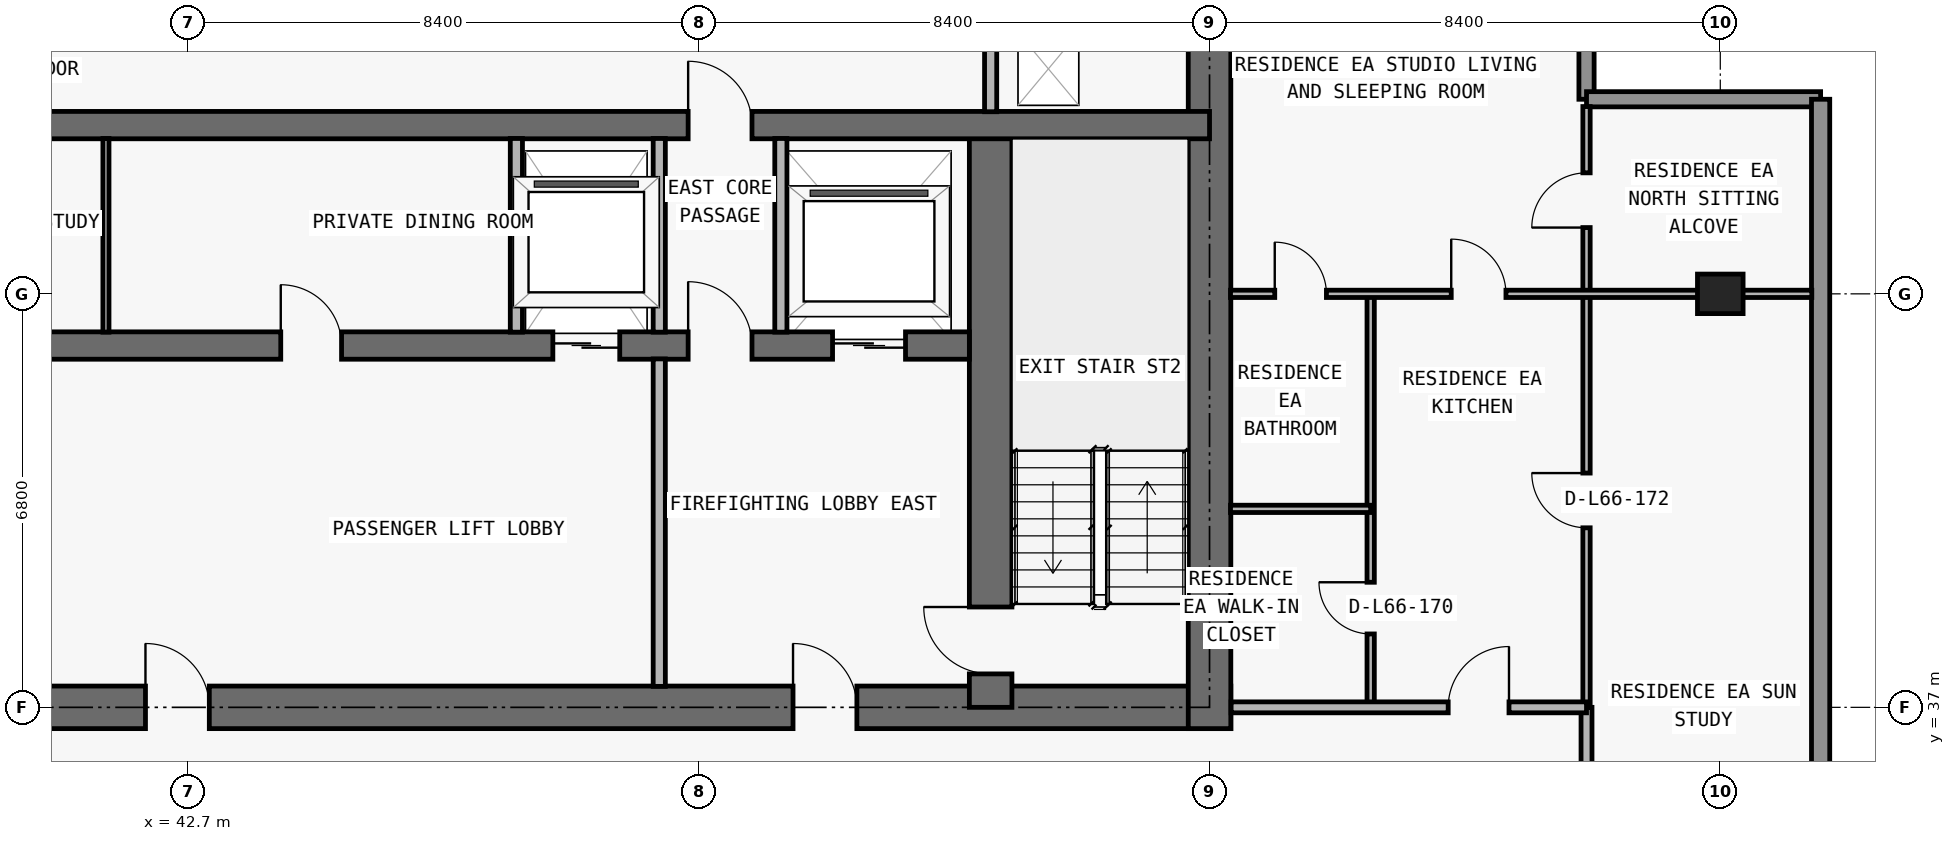
"""IFC4 building model, lengths in metres.
Left out: names, types, materials, properties, quantities, classifications, styles, units other than length and angle.
Written with IfcOpenShell. Run it as: python <this file> out.ifc"""

import sys

from ifc_helpers import new_model, si_unit, direction, frame, frame_2d, origin, origin_2d, place, context, subcontext, project, spatial, rectangle, extrude, element, fill, save


model = new_model("IFC4")
c1 = context("Model", 3, precision=1e-05, world=origin(), true_north=direction((0.0, 1.0)))
c2 = subcontext(c1, "Body", "Model", "MODEL_VIEW")
j1 = project(units=[si_unit("LENGTHUNIT", "METRE"), si_unit("PLANEANGLEUNIT", "RADIAN")], contexts=[c1])
p1 = place(None, origin())
s1 = spatial("IfcSite", under=j1, at=p1, CompositionType="ELEMENT")
p2 = place(p1, origin())
s2 = spatial("IfcBuilding", under=s1, at=p2, CompositionType="ELEMENT")
p3 = place(p2, frame((0.0, 0.0, 236.4)))
s3 = spatial("IfcBuildingStorey", under=s2, at=p3, CompositionType="ELEMENT", Elevation=236.4)
p4 = place(p3, frame((67.9, 43.8, 0.0), z_axis=(0.0, 0.0, 1.0), x_axis=(1.0, 0.0, 0.0)))
e1 = element("IfcColumn", 1, at=p4, inside=s3, PredefinedType="COLUMN", context=c2, shape_type="SweptSolid", body=[
    extrude(rectangle(XDim=0.75, YDim=0.65, at=origin_2d()), origin(), (0.0, 0.0, 1.0), 3.05),
])
p5 = place(p3, frame((17.95, 37.0, 0.0), z_axis=(0.0, 0.0, 1.0), x_axis=(1.0, 0.0, 0.0)))
e2 = element("IfcWall", 2, at=p5, inside=s3, PredefinedType="SHEAR", context=c2, shape_type="SweptSolid", body=[
    extrude(rectangle(XDim=41.9, YDim=0.7, at=frame_2d((20.95, 0.0))), origin(), (0.0, 0.0, 1.0), 3.05),
])
p6 = place(p5, frame((14.35, 0.0, 0.0)))
e3 = element("IfcOpeningElement", 3, at=p6, cuts=e2, PredefinedType="OPENING", context=c2, shape_type="SweptSolid", body=[
    extrude(rectangle(XDim=1.1, YDim=2.15, at=frame_2d((0.55, 1.075))), frame((0.0, 0.36, 0.0), z_axis=(0.0, -1.0, 0.0), x_axis=(1.0, 0.0, 0.0)), (0.0, 0.0, 1.0), 0.72),
])
p7 = place(p5, frame((6.2, 0.0, 0.0)))
e4 = element("IfcOpeningElement", 4, at=p7, cuts=e2, PredefinedType="OPENING", context=c2, shape_type="SweptSolid", body=[
    extrude(rectangle(XDim=1.05, YDim=2.15, at=frame_2d((0.525, 1.075))), frame((0.0, 0.36, 0.0), z_axis=(0.0, -1.0, 0.0), x_axis=(1.0, 0.0, 0.0)), (0.0, 0.0, 1.0), 0.72),
])
p8 = place(p5, frame((34.7, 0.0, 0.0)))
e5 = element("IfcOpeningElement", 5, at=p8, cuts=e2, PredefinedType="OPENING", context=c2, shape_type="SweptSolid", body=[
    extrude(rectangle(XDim=1.05, YDim=2.15, at=frame_2d((0.525, 1.075))), frame((0.0, 0.36, 0.0), z_axis=(0.0, -1.0, 0.0), x_axis=(1.0, 0.0, 0.0)), (0.0, 0.0, 1.0), 0.72),
])
p9 = place(p5, frame((10.812, 0.0, 0.0)))
e6 = element("IfcOpeningElement", 6, at=p9, cuts=e2, PredefinedType="OPENING", context=c2, shape_type="SweptSolid", body=[
    extrude(rectangle(XDim=1.05, YDim=2.15, at=frame_2d((0.525, 1.075))), frame((0.0, 0.36, 0.0), z_axis=(0.0, -1.0, 0.0), x_axis=(1.0, 0.0, 0.0)), (0.0, 0.0, 1.0), 0.72),
])
p10 = place(p5, frame((24.05, 0.0, 0.0)))
e7 = element("IfcOpeningElement", 7, at=p10, cuts=e2, PredefinedType="OPENING", context=c2, shape_type="SweptSolid", body=[
    extrude(rectangle(XDim=1.05, YDim=2.15, at=frame_2d((0.525, 1.075))), frame((0.0, 0.36, 0.0), z_axis=(0.0, -1.0, 0.0), x_axis=(1.0, 0.0, 0.0)), (0.0, 0.0, 1.0), 0.72),
])
p11 = place(p3, frame((59.5, 36.65, 0.0), z_axis=(0.0, 0.0, 1.0), x_axis=(0.0, 1.0, 0.0)))
e8 = element("IfcWall", 8, at=p11, inside=s3, PredefinedType="SHEAR", context=c2, shape_type="SweptSolid", body=[
    extrude(rectangle(XDim=13.95, YDim=0.7, at=frame_2d((6.975, 0.0))), origin(), (0.0, 0.0, 1.0), 3.05),
])
p12 = place(p3, frame((55.9, 37.0, 0.0), z_axis=(0.0, 0.0, 1.0), x_axis=(0.0, 1.0, 0.0)))
e9 = element("IfcWall", 9, at=p12, inside=s3, PredefinedType="SHEAR", context=c2, shape_type="SweptSolid", body=[
    extrude(rectangle(XDim=9.575, YDim=0.7, at=frame_2d((4.788, 0.0))), origin(), (0.0, 0.0, 1.0), 3.05),
])
p13 = place(p12, frame((0.55, 0.0, 0.0)))
e10 = element("IfcOpeningElement", 10, at=p13, cuts=e9, PredefinedType="OPENING", context=c2, shape_type="SweptSolid", body=[
    extrude(rectangle(XDim=1.1, YDim=2.15, at=frame_2d((0.55, 1.075))), frame((0.0, 0.36, 0.0), z_axis=(0.0, -1.0, 0.0), x_axis=(1.0, 0.0, 0.0)), (0.0, 0.0, 1.0), 0.72),
])
p14 = place(p3, frame((22.25, 42.95, 0.0), z_axis=(0.0, 0.0, 1.0), x_axis=(1.0, 0.0, 0.0)))
e11 = element("IfcWall", 11, at=p14, inside=s3, PredefinedType="SHEAR", context=c2, shape_type="SweptSolid", body=[
    extrude(rectangle(XDim=33.3, YDim=0.45, at=frame_2d((16.65, 0.0))), origin(), (0.0, 0.0, 1.0), 3.05),
])
p15 = place(p14, frame((1.05, 0.0, 0.0)))
e12 = element("IfcOpeningElement", 12, at=p15, cuts=e11, PredefinedType="OPENING", context=c2, shape_type="SweptSolid", body=[
    extrude(rectangle(XDim=1.2, YDim=2.2, at=frame_2d((0.6, 1.1))), frame((0.0, 0.235, 0.0), z_axis=(0.0, -1.0, 0.0), x_axis=(1.0, 0.0, 0.0)), (0.0, 0.0, 1.0), 0.47),
])
p16 = place(p14, frame((31.05, 0.0, 0.0)))
e13 = element("IfcOpeningElement", 13, at=p16, cuts=e11, PredefinedType="OPENING", context=c2, shape_type="SweptSolid", body=[
    extrude(rectangle(XDim=1.2, YDim=2.2, at=frame_2d((0.6, 1.1))), frame((0.0, 0.235, 0.0), z_axis=(0.0, -1.0, 0.0), x_axis=(1.0, 0.0, 0.0)), (0.0, 0.0, 1.0), 0.47),
])
p17 = place(p14, frame((26.45, 0.0, 0.0)))
e14 = element("IfcOpeningElement", 14, at=p17, cuts=e11, PredefinedType="OPENING", context=c2, shape_type="SweptSolid", body=[
    extrude(rectangle(XDim=1.1, YDim=2.2, at=frame_2d((0.55, 1.1))), frame((0.0, 0.235, 0.0), z_axis=(0.0, -1.0, 0.0), x_axis=(1.0, 0.0, 0.0)), (0.0, 0.0, 1.0), 0.47),
])
p18 = place(p14, frame((5.95, 0.0, 0.0)))
e15 = element("IfcOpeningElement", 15, at=p18, cuts=e11, PredefinedType="OPENING", context=c2, shape_type="SweptSolid", body=[
    extrude(rectangle(XDim=1.1, YDim=2.2, at=frame_2d((0.55, 1.1))), frame((0.0, 0.235, 0.0), z_axis=(0.0, -1.0, 0.0), x_axis=(1.0, 0.0, 0.0)), (0.0, 0.0, 1.0), 0.47),
])
p19 = place(p14, frame((3.625, 0.0, 0.0)))
e16 = element("IfcOpeningElement", 16, at=p19, cuts=e11, PredefinedType="OPENING", context=c2, shape_type="SweptSolid", body=[
    extrude(rectangle(XDim=1.05, YDim=2.15, at=frame_2d((0.525, 1.075))), frame((0.0, 0.235, 0.0), z_axis=(0.0, -1.0, 0.0), x_axis=(1.0, 0.0, 0.0)), (0.0, 0.0, 1.0), 0.47),
])
p20 = place(p14, frame((28.675, 0.0, 0.0)))
e17 = element("IfcOpeningElement", 17, at=p20, cuts=e11, PredefinedType="OPENING", context=c2, shape_type="SweptSolid", body=[
    extrude(rectangle(XDim=1.05, YDim=2.15, at=frame_2d((0.525, 1.075))), frame((0.0, 0.235, 0.0), z_axis=(0.0, -1.0, 0.0), x_axis=(1.0, 0.0, 0.0)), (0.0, 0.0, 1.0), 0.47),
])
p21 = place(p14, frame((15.225, 0.0, 0.0)))
e18 = element("IfcOpeningElement", 18, at=p21, cuts=e11, PredefinedType="OPENING", context=c2, shape_type="SweptSolid", body=[
    extrude(rectangle(XDim=1.0, YDim=2.2, at=frame_2d((0.5, 1.1))), frame((0.0, 0.235, 0.0), z_axis=(0.0, -1.0, 0.0), x_axis=(1.0, 0.0, 0.0)), (0.0, 0.0, 1.0), 0.47),
])
p22 = place(p14, frame((21.975, 0.0, 0.0)))
e19 = element("IfcOpeningElement", 19, at=p22, cuts=e11, PredefinedType="OPENING", context=c2, shape_type="SweptSolid", body=[
    extrude(rectangle(XDim=1.0, YDim=2.2, at=frame_2d((0.5, 1.1))), frame((0.0, 0.235, 0.0), z_axis=(0.0, -1.0, 0.0), x_axis=(1.0, 0.0, 0.0)), (0.0, 0.0, 1.0), 0.47),
])
p23 = place(p3, frame((18.3, 46.575, 0.0), z_axis=(0.0, 0.0, 1.0), x_axis=(1.0, 0.0, 0.0)))
e20 = element("IfcWall", 20, at=p23, inside=s3, PredefinedType="SHEAR", context=c2, shape_type="SweptSolid", body=[
    extrude(rectangle(XDim=41.2, YDim=0.45, at=frame_2d((20.6, 0.0))), origin(), (0.0, 0.0, 1.0), 3.05),
])
p24 = place(p23, frame((7.575, 0.0, 0.0)))
e21 = element("IfcOpeningElement", 21, at=p24, cuts=e20, PredefinedType="OPENING", context=c2, shape_type="SweptSolid", body=[
    extrude(rectangle(XDim=1.05, YDim=2.15, at=frame_2d((0.525, 1.075))), frame((0.0, 0.235, 0.0), z_axis=(0.0, -1.0, 0.0), x_axis=(1.0, 0.0, 0.0)), (0.0, 0.0, 1.0), 0.47),
])
p25 = place(p23, frame((32.625, 0.0, 0.0)))
e22 = element("IfcOpeningElement", 22, at=p25, cuts=e20, PredefinedType="OPENING", context=c2, shape_type="SweptSolid", body=[
    extrude(rectangle(XDim=1.05, YDim=2.15, at=frame_2d((0.525, 1.075))), frame((0.0, 0.235, 0.0), z_axis=(0.0, -1.0, 0.0), x_axis=(1.0, 0.0, 0.0)), (0.0, 0.0, 1.0), 0.47),
])
p26 = place(p3, frame((65.7, 50.45, 0.0), z_axis=(0.0, 0.0, 1.0), x_axis=(0.0, -1.0, 0.0)))
e23 = element("IfcWall", 23, at=p26, inside=s3, PredefinedType="ELEMENTEDWALL", context=c2, shape_type="SweptSolid", body=[
    extrude(rectangle(XDim=3.45, YDim=0.25, at=frame_2d((1.725, 0.0))), origin(), (0.0, 0.0, 1.0), 3.05),
])
p27 = place(p3, frame((65.7, 47.0, 0.0), z_axis=(0.0, 0.0, 1.0), x_axis=(1.0, 0.0, 0.0)))
e24 = element("IfcWall", 24, at=p27, inside=s3, PredefinedType="ELEMENTEDWALL", context=c2, shape_type="SweptSolid", body=[
    extrude(rectangle(XDim=3.85, YDim=0.25, at=frame_2d((1.925, 0.0))), origin(), (0.0, 0.0, 1.0), 3.05),
])
p28 = place(p3, frame((69.55, 47.0, 0.0), z_axis=(0.0, 0.0, 1.0), x_axis=(0.0, -1.0, 0.0)))
e25 = element("IfcWall", 25, at=p28, inside=s3, PredefinedType="STANDARD", context=c2, shape_type="SweptSolid", body=[
    extrude(rectangle(XDim=16.85, YDim=0.3, at=frame_2d((8.425, 0.0))), origin(), (0.0, 0.0, 1.0), 3.05),
])
p29 = place(p3, frame((41.35, 43.17, 0.0), z_axis=(0.0, 0.0, 1.0), x_axis=(0.0, 1.0, 0.0)))
e26 = element("IfcWall", 26, at=p29, inside=s3, PredefinedType="MOVABLE", context=c2, shape_type="SweptSolid", body=[
    extrude(rectangle(XDim=3.185, YDim=0.1, at=frame_2d((1.593, 0.0))), origin(), (0.0, 0.0, 1.0), 3.05),
])
p30 = place(p3, frame((48.1, 43.17, 0.0), z_axis=(0.0, 0.0, 1.0), x_axis=(0.0, 1.0, 0.0)))
e27 = element("IfcWall", 27, at=p30, inside=s3, PredefinedType="PARTITIONING", context=c2, shape_type="SweptSolid", body=[
    extrude(rectangle(XDim=3.185, YDim=0.2, at=frame_2d((1.593, 0.0))), origin(), (0.0, 0.0, 1.0), 3.05),
])
p31 = place(p3, frame((50.45, 37.345, 0.0), z_axis=(0.0, 0.0, 1.0), x_axis=(0.0, 1.0, 0.0)))
e28 = element("IfcWall", 28, at=p31, inside=s3, PredefinedType="PARTITIONING", context=c2, shape_type="SweptSolid", body=[
    extrude(rectangle(XDim=5.385, YDim=0.2, at=frame_2d((2.692, 0.0))), origin(), (0.0, 0.0, 1.0), 3.05),
])
for number, where, z_axis, x_axis in (
    (29, (50.45, 43.17, 0.0), (0.0, 0.0, 1.0), (0.0, 1.0, 0.0)),
    (30, (52.45, 43.17, 0.0), (0.0, 0.0, 1.0), (0.0, 1.0, 0.0)),
):
    element("IfcWall", number, at=place(p3, frame(where, z_axis=z_axis, x_axis=x_axis)), inside=s3, PredefinedType="PARTITIONING", context=c2, shape_type="SweptSolid", body=[
        extrude(rectangle(XDim=3.185, YDim=0.2, at=frame_2d((1.593, 0.0))), origin(), (0.0, 0.0, 1.0), 3.05),
    ])
p32 = place(p3, frame((55.9, 46.795, 0.0), z_axis=(0.0, 0.0, 1.0), x_axis=(0.0, 1.0, 0.0)))
e31 = element("IfcWall", 31, at=p32, inside=s3, PredefinedType="PARTITIONING", context=c2, shape_type="SweptSolid", body=[
    extrude(rectangle(XDim=3.16, YDim=0.2, at=frame_2d((1.58, 0.0))), origin(), (0.0, 0.0, 1.0), 3.05),
])
p33 = place(p3, frame((62.15, 37.0, 0.0), z_axis=(0.0, 0.0, 1.0), x_axis=(0.0, 1.0, 0.0)))
e32 = element("IfcWall", 32, at=p33, inside=s3, PredefinedType="PARTITIONING", context=c2, shape_type="SweptSolid", body=[
    extrude(rectangle(XDim=6.8, YDim=0.12, at=frame_2d((3.4, 0.0))), origin(), (0.0, 0.0, 1.0), 3.05),
])
p34 = place(p33, frame((1.207, 0.0, 0.0)))
e33 = element("IfcOpeningElement", 33, at=p34, cuts=e32, PredefinedType="OPENING", context=c2, shape_type="SweptSolid", body=[
    extrude(rectangle(XDim=0.85, YDim=2.1, at=frame_2d((0.425, 1.05))), frame((0.0, 0.07, 0.0), z_axis=(0.0, -1.0, 0.0), x_axis=(1.0, 0.0, 0.0)), (0.0, 0.0, 1.0), 0.14),
])
p35 = place(p3, frame((65.7, 34.005, 0.0), z_axis=(0.0, 0.0, 1.0), x_axis=(0.0, 1.0, 0.0)))
e34 = element("IfcWall", 34, at=p35, inside=s3, PredefinedType="PARTITIONING", context=c2, shape_type="SweptSolid", body=[
    extrude(rectangle(XDim=2.995, YDim=0.18, at=frame_2d((1.498, 0.0))), origin(), (0.0, 0.0, 1.0), 2.629),
])
p36 = place(p3, frame((65.7, 37.005, 0.0), z_axis=(0.0, 0.0, 1.0), x_axis=(0.0, 1.0, 0.0)))
e35 = element("IfcWall", 35, at=p36, inside=s3, PredefinedType="PARTITIONING", context=c2, shape_type="SweptSolid", body=[
    extrude(rectangle(XDim=9.875, YDim=0.12, at=frame_2d((4.938, 0.0))), origin(), (0.0, 0.0, 1.0), 2.629),
])
p37 = place(p36, frame((2.948, 0.0, 0.0)))
e36 = element("IfcOpeningElement", 36, at=p37, cuts=e35, PredefinedType="OPENING", context=c2, shape_type="SweptSolid", body=[
    extrude(rectangle(XDim=0.9, YDim=2.15, at=frame_2d((0.45, 1.075))), frame((0.0, 0.07, 0.0), z_axis=(0.0, -1.0, 0.0), x_axis=(1.0, 0.0, 0.0)), (0.0, 0.0, 1.0), 0.14),
])
p38 = place(p36, frame((7.885, 0.0, 0.0)))
e37 = element("IfcOpeningElement", 37, at=p38, cuts=e35, PredefinedType="OPENING", context=c2, shape_type="SweptSolid", body=[
    extrude(rectangle(XDim=0.9, YDim=2.15, at=frame_2d((0.45, 1.075))), frame((0.0, 0.07, 0.0), z_axis=(0.0, -1.0, 0.0), x_axis=(1.0, 0.0, 0.0)), (0.0, 0.0, 1.0), 0.14),
])
p39 = place(p3, frame((59.855, 37.0, 0.0), z_axis=(0.0, 0.0, 1.0), x_axis=(1.0, 0.0, 0.0)))
e38 = element("IfcWall", 38, at=p39, inside=s3, PredefinedType="PARTITIONING", context=c2, shape_type="SweptSolid", body=[
    extrude(rectangle(XDim=5.845, YDim=0.18, at=frame_2d((2.922, 0.0))), origin(), (0.0, 0.0, 1.0), 3.05),
])
p40 = place(p39, frame((3.57, 0.0, 0.0)))
e39 = element("IfcOpeningElement", 39, at=p40, cuts=e38, PredefinedType="OPENING", context=c2, shape_type="SweptSolid", body=[
    extrude(rectangle(XDim=1.0, YDim=2.2, at=frame_2d((0.5, 1.1))), frame((0.0, 0.1, 0.0), z_axis=(0.0, -1.0, 0.0), x_axis=(1.0, 0.0, 0.0)), (0.0, 0.0, 1.0), 0.2),
])
p41 = place(p3, frame((59.845, 40.264, 0.0), z_axis=(0.0, 0.0, 1.0), x_axis=(1.0, 0.0, 0.0)))
e40 = element("IfcWall", 40, at=p41, inside=s3, PredefinedType="PARTITIONING", context=c2, shape_type="SweptSolid", body=[
    extrude(rectangle(XDim=2.305, YDim=0.12, at=frame_2d((1.152, 0.0))), origin(), (0.0, 0.0, 1.0), 3.05),
])
p42 = place(p3, frame((59.845, 43.8, 0.0), z_axis=(0.0, 0.0, 1.0), x_axis=(1.0, 0.0, 0.0)))
e41 = element("IfcWall", 41, at=p42, inside=s3, PredefinedType="PARTITIONING", context=c2, shape_type="SweptSolid", body=[
    extrude(rectangle(XDim=9.56, YDim=0.12, at=frame_2d((4.78, 0.0))), origin(), (0.0, 0.0, 1.0), 2.418),
])
p43 = place(p42, frame((3.63, 0.0, 0.0)))
e42 = element("IfcOpeningElement", 42, at=p43, cuts=e41, PredefinedType="OPENING", context=c2, shape_type="SweptSolid", body=[
    extrude(rectangle(XDim=0.9, YDim=2.15, at=frame_2d((0.45, 1.075))), frame((0.0, 0.07, 0.0), z_axis=(0.0, -1.0, 0.0), x_axis=(1.0, 0.0, 0.0)), (0.0, 0.0, 1.0), 0.14),
])
p44 = place(p42, frame((0.728, 0.0, 0.0)))
e43 = element("IfcOpeningElement", 43, at=p44, cuts=e41, PredefinedType="OPENING", context=c2, shape_type="SweptSolid", body=[
    extrude(rectangle(XDim=0.85, YDim=2.1, at=frame_2d((0.425, 1.05))), frame((0.0, 0.07, 0.0), z_axis=(0.0, -1.0, 0.0), x_axis=(1.0, 0.0, 0.0)), (0.0, 0.0, 1.0), 0.14),
])
p45 = place(p16, origin())
e44 = element("IfcDoor", 44, at=p45, inside=s3, OperationType="DOUBLE_DOOR_SLIDING", PredefinedType="DOOR", context=c2, shape_type="SweptSolid", body=[
    extrude(rectangle(XDim=1.2, YDim=2.2, at=frame_2d((0.6, 1.1))), frame((0.0, 0.025, 0.0), z_axis=(0.0, -1.0, 0.0), x_axis=(1.0, 0.0, 0.0)), (0.0, 0.0, 1.0), 0.05),
])
fill(e13, e44)
p46 = place(p17, origin())
e45 = element("IfcDoor", 45, at=p46, inside=s3, OperationType="DOUBLE_DOOR_SLIDING", PredefinedType="DOOR", context=c2, shape_type="SweptSolid", body=[
    extrude(rectangle(XDim=1.1, YDim=2.2, at=frame_2d((0.55, 1.1))), frame((0.0, 0.025, 0.0), z_axis=(0.0, -1.0, 0.0), x_axis=(1.0, 0.0, 0.0)), (0.0, 0.0, 1.0), 0.05),
])
fill(e14, e45)
p47 = place(p8, origin())
e46 = element("IfcDoor", 46, at=p47, inside=s3, OperationType="SINGLE_SWING_LEFT", PredefinedType="DOOR", context=c2, shape_type="SweptSolid", body=[
    extrude(rectangle(XDim=1.05, YDim=2.15, at=frame_2d((0.525, 1.075))), frame((0.0, 0.025, 0.0), z_axis=(0.0, -1.0, 0.0), x_axis=(1.0, 0.0, 0.0)), (0.0, 0.0, 1.0), 0.05),
])
fill(e5, e46)
p48 = place(p13, origin())
e47 = element("IfcDoor", 47, at=p48, inside=s3, OperationType="SINGLE_SWING_RIGHT", PredefinedType="DOOR", context=c2, shape_type="SweptSolid", body=[
    extrude(rectangle(XDim=1.1, YDim=2.15, at=frame_2d((0.55, 1.075))), frame((0.0, 0.025, 0.0), z_axis=(0.0, -1.0, 0.0), x_axis=(1.0, 0.0, 0.0)), (0.0, 0.0, 1.0), 0.05),
])
fill(e10, e47)
p49 = place(p20, origin())
e48 = element("IfcDoor", 48, at=p49, inside=s3, OperationType="SINGLE_SWING_LEFT", PredefinedType="DOOR", context=c2, shape_type="SweptSolid", body=[
    extrude(rectangle(XDim=1.05, YDim=2.15, at=frame_2d((0.525, 1.075))), frame((0.0, 0.025, 0.0), z_axis=(0.0, -1.0, 0.0), x_axis=(1.0, 0.0, 0.0)), (0.0, 0.0, 1.0), 0.05),
])
fill(e17, e48)
p50 = place(p10, origin())
e49 = element("IfcDoor", 49, at=p50, inside=s3, OperationType="SINGLE_SWING_LEFT", PredefinedType="DOOR", context=c2, shape_type="SweptSolid", body=[
    extrude(rectangle(XDim=1.05, YDim=2.15, at=frame_2d((0.525, 1.075))), frame((0.0, 0.025, 0.0), z_axis=(0.0, -1.0, 0.0), x_axis=(1.0, 0.0, 0.0)), (0.0, 0.0, 1.0), 0.05),
])
fill(e7, e49)
p51 = place(p22, origin())
e50 = element("IfcDoor", 50, at=p51, inside=s3, OperationType="SINGLE_SWING_LEFT", PredefinedType="DOOR", context=c2, shape_type="SweptSolid", body=[
    extrude(rectangle(XDim=1.0, YDim=2.2, at=frame_2d((0.5, 1.1))), frame((0.0, 0.025, 0.0), z_axis=(0.0, -1.0, 0.0), x_axis=(1.0, 0.0, 0.0)), (0.0, 0.0, 1.0), 0.05),
])
fill(e19, e50)
p52 = place(p25, origin())
e51 = element("IfcDoor", 51, at=p52, inside=s3, OperationType="SINGLE_SWING_LEFT", PredefinedType="DOOR", context=c2, shape_type="SweptSolid", body=[
    extrude(rectangle(XDim=1.05, YDim=2.15, at=frame_2d((0.525, 1.075))), frame((0.0, 0.025, 0.0), z_axis=(0.0, -1.0, 0.0), x_axis=(1.0, 0.0, 0.0)), (0.0, 0.0, 1.0), 0.05),
])
fill(e22, e51)
p53 = place(p40, origin())
e52 = element("IfcDoor", 52, at=p53, inside=s3, OperationType="SINGLE_SWING_RIGHT", PredefinedType="DOOR", context=c2, shape_type="SweptSolid", body=[
    extrude(rectangle(XDim=1.0, YDim=2.2, at=frame_2d((0.5, 1.1))), frame((0.0, 0.025, 0.0), z_axis=(0.0, -1.0, 0.0), x_axis=(1.0, 0.0, 0.0)), (0.0, 0.0, 1.0), 0.05),
])
fill(e39, e52)
p54 = place(p43, origin())
e53 = element("IfcDoor", 53, at=p54, inside=s3, OperationType="SINGLE_SWING_LEFT", PredefinedType="DOOR", context=c2, shape_type="SweptSolid", body=[
    extrude(rectangle(XDim=0.9, YDim=2.15, at=frame_2d((0.45, 1.075))), frame((0.0, 0.025, 0.0), z_axis=(0.0, -1.0, 0.0), x_axis=(1.0, 0.0, 0.0)), (0.0, 0.0, 1.0), 0.05),
])
fill(e42, e53)
p55 = place(p34, origin())
e54 = element("IfcDoor", 54, at=p55, inside=s3, OperationType="SINGLE_SWING_RIGHT", PredefinedType="DOOR", context=c2, shape_type="SweptSolid", body=[
    extrude(rectangle(XDim=0.85, YDim=2.1, at=frame_2d((0.425, 1.05))), frame((0.0, 0.025, 0.0), z_axis=(0.0, -1.0, 0.0), x_axis=(1.0, 0.0, 0.0)), (0.0, 0.0, 1.0), 0.05),
])
fill(e33, e54)
p56 = place(p44, origin())
e55 = element("IfcDoor", 55, at=p56, inside=s3, OperationType="SINGLE_SWING_LEFT", PredefinedType="DOOR", context=c2, shape_type="SweptSolid", body=[
    extrude(rectangle(XDim=0.85, YDim=2.1, at=frame_2d((0.425, 1.05))), frame((0.0, 0.025, 0.0), z_axis=(0.0, -1.0, 0.0), x_axis=(1.0, 0.0, 0.0)), (0.0, 0.0, 1.0), 0.05),
])
fill(e43, e55)
p57 = place(p37, origin())
e56 = element("IfcDoor", 56, at=p57, inside=s3, OperationType="SINGLE_SWING_RIGHT", PredefinedType="DOOR", context=c2, shape_type="SweptSolid", body=[
    extrude(rectangle(XDim=0.9, YDim=2.15, at=frame_2d((0.45, 1.075))), frame((0.0, 0.025, 0.0), z_axis=(0.0, -1.0, 0.0), x_axis=(1.0, 0.0, 0.0)), (0.0, 0.0, 1.0), 0.05),
])
fill(e36, e56)
p58 = place(p38, origin())
e57 = element("IfcDoor", 57, at=p58, inside=s3, OperationType="SINGLE_SWING_LEFT", PredefinedType="DOOR", context=c2, shape_type="SweptSolid", body=[
    extrude(rectangle(XDim=0.9, YDim=2.15, at=frame_2d((0.45, 1.075))), frame((0.0, 0.025, 0.0), z_axis=(0.0, -1.0, 0.0), x_axis=(1.0, 0.0, 0.0)), (0.0, 0.0, 1.0), 0.05),
])
fill(e37, e57)
save(model, sys.argv[1])
